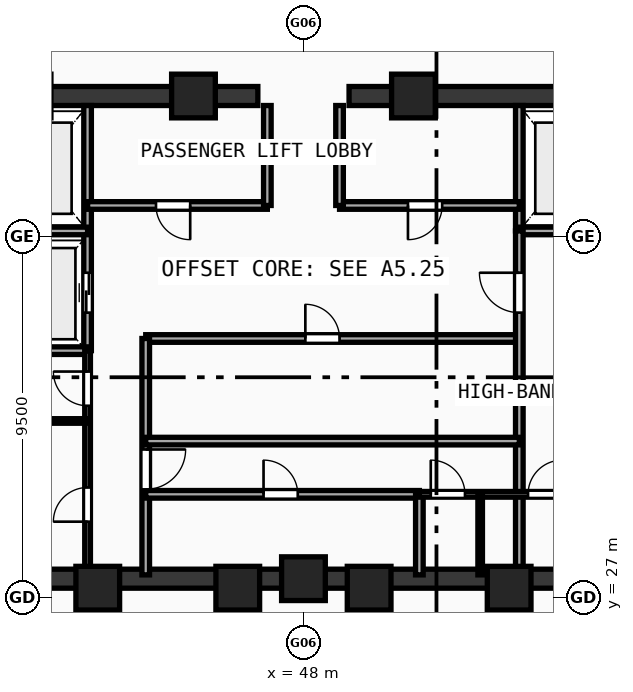
"""IFC4 building model, lengths in metres.
Left out: names, types, materials, properties, quantities, classifications, styles, units other than length and angle.
Written with IfcOpenShell. Run it as: python <this file> out.ifc"""

import sys

from ifc_helpers import new_model, si_unit, direction, frame, frame_2d, origin, origin_with_axes, origin_2d, place, context, subcontext, project, spatial, rectangle, hollow_rectangle, extrude, source, transform, mapped, element, fill, save


model = new_model("IFC4")
c1 = context("Model", 3, precision=1e-05, world=origin(), true_north=direction((0.0, 1.0)))
c2 = subcontext(c1, "Body", "Model", "MODEL_VIEW")
j1 = project(units=[si_unit("LENGTHUNIT", "METRE"), si_unit("PLANEANGLEUNIT", "RADIAN")], contexts=[c1])
p1 = place(None, origin())
s1 = spatial("IfcSite", under=j1, at=p1, CompositionType="ELEMENT")
p2 = place(p1, origin())
s2 = spatial("IfcBuilding", under=s1, at=p2, CompositionType="ELEMENT")
p3 = place(p2, frame((0.0, 0.0, 396.76)))
s3 = spatial("IfcBuildingStorey", under=s2, at=p3, CompositionType="ELEMENT", Elevation=396.76)
p4 = place(p3, frame((35.55, 27.5, 0.0), z_axis=(0.0, 0.0, 1.0), x_axis=(1.0, 0.0, 0.0)))
e1 = element("IfcWall", 1, at=p4, inside=s3, PredefinedType="SHEAR", context=c2, shape_type="SweptSolid", body=[
    extrude(rectangle(XDim=24.9, YDim=0.5, at=frame_2d((12.45, 0.0))), origin(), (0.0, 0.0, 1.0), 4.72),
])
p5 = place(p3, frame((35.55, 40.2, 0.0), z_axis=(0.0, 0.0, 1.0), x_axis=(1.0, 0.0, 0.0)))
e2 = element("IfcWall", 2, at=p5, inside=s3, PredefinedType="SHEAR", context=c2, shape_type="SweptSolid", body=[
    extrude(rectangle(XDim=11.25, YDim=0.5, at=frame_2d((5.625, 0.0))), origin(), (0.0, 0.0, 1.0), 4.72),
])
p6 = place(p5, frame((1.6, 0.0, 0.0)))
e3 = element("IfcOpeningElement", 3, at=p6, cuts=e2, PredefinedType="OPENING", context=c2, shape_type="SweptSolid", body=[
    extrude(rectangle(XDim=1.05, YDim=2.1, at=frame_2d((0.525, 1.05))), frame((0.0, 0.26, 0.0), z_axis=(0.0, -1.0, 0.0), x_axis=(1.0, 0.0, 0.0)), (0.0, 0.0, 1.0), 0.52),
])
p7 = place(p3, frame((49.2, 40.2, 0.0), z_axis=(0.0, 0.0, 1.0), x_axis=(1.0, 0.0, 0.0)))
e4 = element("IfcWall", 4, at=p7, inside=s3, PredefinedType="SHEAR", context=c2, shape_type="SweptSolid", body=[
    extrude(rectangle(XDim=11.25, YDim=0.5, at=frame_2d((5.625, 0.0))), origin(), (0.0, 0.0, 1.0), 4.72),
])
p8 = place(p7, frame((8.6, 0.0, 0.0)))
e5 = element("IfcOpeningElement", 5, at=p8, cuts=e4, PredefinedType="OPENING", context=c2, shape_type="SweptSolid", body=[
    extrude(rectangle(XDim=1.05, YDim=2.1, at=frame_2d((0.525, 1.05))), frame((0.0, 0.26, 0.0), z_axis=(0.0, -1.0, 0.0), x_axis=(1.0, 0.0, 0.0)), (0.0, 0.0, 1.0), 0.52),
])
m1 = source(origin(), c2, "Body", "SweptSolid", [
    extrude(hollow_rectangle(XDim=1.15, YDim=1.15, WallThickness=0.048, at=origin_2d()), origin(), (0.0, 0.0, 1.0), 5.0),
])
for number, where, z_axis, x_axis in (
    (6, (42.588, 27.25, -0.28), (0.0, 0.0, 1.0), (1.0, 0.0, 0.0)),
    (7, (46.272, 27.25, -0.28), (0.0, 0.0, 1.0), (1.0, 0.0, 0.0)),
    (8, (49.729, 27.25, -0.28), (0.0, 0.0, 1.0), (1.0, 0.0, 0.0)),
    (9, (53.412, 27.25, -0.28), (0.0, 0.0, 1.0), (1.0, 0.0, 0.0)),
    (10, (50.894, 40.2, -0.28), (0.0, 0.0, 1.0), (1.0, 0.0, 0.0)),
    (11, (45.106, 40.2, -0.28), (0.0, 0.0, 1.0), (1.0, 0.0, 0.0)),
    (12, (48.0, 27.5, -0.28), (0.0, 0.0, 1.0), (1.0, 0.0, 0.0)),
):
    element("IfcColumn", number, at=place(p3, frame(where, z_axis=z_axis, x_axis=x_axis)), inside=s3, PredefinedType="COLUMN", context=c2, shape_type="MappedRepresentation", body=[
        mapped(m1, transform((0.0, 0.0, 0.0), scale=1.0)),
    ])
p9 = place(p3, frame((42.32, 33.5, 0.0), z_axis=(0.0, 0.0, 1.0), x_axis=(0.0, 1.0, 0.0)))
e13 = element("IfcWall", 13, at=p9, inside=s3, PredefinedType="SOLIDWALL", context=c2, shape_type="SweptSolid", body=[
    extrude(rectangle(XDim=6.45, YDim=0.2, at=frame_2d((3.225, 0.0))), origin(), (0.0, 0.0, 1.0), 4.72),
])
p10 = place(p9, frame((1.0, 0.0, 0.0)))
e14 = element("IfcOpeningElement", 14, at=p10, cuts=e13, PredefinedType="OPENING", context=c2, shape_type="SweptSolid", body=[
    extrude(rectangle(XDim=1.05, YDim=2.1, at=frame_2d((0.525, 1.05))), frame((0.0, 0.11, 0.0), z_axis=(0.0, -1.0, 0.0), x_axis=(1.0, 0.0, 0.0)), (0.0, 0.0, 1.0), 0.22),
])
for number, where, z_axis, x_axis in (
    (15, (39.6, 36.65, 0.0), (0.0, 0.0, 1.0), (1.0, 0.0, 0.0)),
    (16, (39.6, 33.5, 0.0), (0.0, 0.0, 1.0), (1.0, 0.0, 0.0)),
):
    element("IfcWall", number, at=place(p3, frame(where, z_axis=z_axis, x_axis=x_axis)), inside=s3, PredefinedType="SOLIDWALL", context=c2, shape_type="SweptSolid", body=[
        extrude(rectangle(XDim=2.72, YDim=0.2, at=frame_2d((1.36, 0.0))), origin(), (0.0, 0.0, 1.0), 4.72),
    ])
p11 = place(p3, frame((53.68, 36.65, 0.0), z_axis=(0.0, 0.0, 1.0), x_axis=(0.0, 1.0, 0.0)))
e17 = element("IfcWall", 17, at=p11, inside=s3, PredefinedType="SOLIDWALL", context=c2, shape_type="SweptSolid", body=[
    extrude(rectangle(XDim=3.3, YDim=0.2, at=frame_2d((1.65, 0.0))), origin(), (0.0, 0.0, 1.0), 4.72),
])
p12 = place(p3, frame((53.68, 36.65, 0.0), z_axis=(0.0, 0.0, 1.0), x_axis=(1.0, 0.0, 0.0)))
e18 = element("IfcWall", 18, at=p12, inside=s3, PredefinedType="SOLIDWALL", context=c2, shape_type="SweptSolid", body=[
    extrude(rectangle(XDim=2.72, YDim=0.2, at=frame_2d((1.36, 0.0))), origin(), (0.0, 0.0, 1.0), 4.72),
])
p13 = place(p3, frame((42.32, 37.32, 0.0), z_axis=(0.0, 0.0, 1.0), x_axis=(1.0, 0.0, 0.0)))
e19 = element("IfcWall", 19, at=p13, inside=s3, PredefinedType="SOLIDWALL", context=c2, shape_type="SweptSolid", body=[
    extrude(rectangle(XDim=4.73, YDim=0.2, at=frame_2d((2.365, 0.0))), origin(), (0.0, 0.0, 1.0), 4.72),
])
p14 = place(p13, frame((1.8, 0.0, 0.0)))
e20 = element("IfcOpeningElement", 20, at=p14, cuts=e19, PredefinedType="OPENING", context=c2, shape_type="SweptSolid", body=[
    extrude(rectangle(XDim=0.9, YDim=2.1, at=frame_2d((0.45, 1.05))), frame((0.0, 0.11, 0.0), z_axis=(0.0, -1.0, 0.0), x_axis=(1.0, 0.0, 0.0)), (0.0, 0.0, 1.0), 0.22),
])
p15 = place(p3, frame((48.95, 37.32, 0.0), z_axis=(0.0, 0.0, 1.0), x_axis=(1.0, 0.0, 0.0)))
e21 = element("IfcWall", 21, at=p15, inside=s3, PredefinedType="SOLIDWALL", context=c2, shape_type="SweptSolid", body=[
    extrude(rectangle(XDim=4.73, YDim=0.2, at=frame_2d((2.365, 0.0))), origin(), (0.0, 0.0, 1.0), 4.72),
])
p16 = place(p15, frame((1.8, 0.0, 0.0)))
e22 = element("IfcOpeningElement", 22, at=p16, cuts=e21, PredefinedType="OPENING", context=c2, shape_type="SweptSolid", body=[
    extrude(rectangle(XDim=0.9, YDim=2.1, at=frame_2d((0.45, 1.05))), frame((0.0, 0.11, 0.0), z_axis=(0.0, -1.0, 0.0), x_axis=(1.0, 0.0, 0.0)), (0.0, 0.0, 1.0), 0.22),
])
for number, where, z_axis, x_axis in (
    (23, (47.05, 37.32, 0.0), (0.0, 0.0, 1.0), (0.0, 1.0, 0.0)),
    (24, (48.95, 37.32, 0.0), (0.0, 0.0, 1.0), (0.0, 1.0, 0.0)),
):
    element("IfcWall", number, at=place(p3, frame(where, z_axis=z_axis, x_axis=x_axis)), inside=s3, PredefinedType="SOLIDWALL", context=c2, shape_type="SweptSolid", body=[
        extrude(rectangle(XDim=2.63, YDim=0.2, at=frame_2d((1.315, 0.0))), origin(), (0.0, 0.0, 1.0), 4.72),
    ])
p17 = place(p3, frame((43.85, 33.82, 0.0), z_axis=(0.0, 0.0, 1.0), x_axis=(1.0, 0.0, 0.0)))
e25 = element("IfcWall", 25, at=p17, inside=s3, PredefinedType="SOLIDWALL", context=c2, shape_type="SweptSolid", body=[
    extrude(rectangle(XDim=9.83, YDim=0.2, at=frame_2d((4.915, 0.0))), origin(), (0.0, 0.0, 1.0), 4.72),
])
p18 = place(p17, frame((4.2, 0.0, 0.0)))
e26 = element("IfcOpeningElement", 26, at=p18, cuts=e25, PredefinedType="OPENING", context=c2, shape_type="SweptSolid", body=[
    extrude(rectangle(XDim=0.9, YDim=2.1, at=frame_2d((0.45, 1.05))), frame((0.0, 0.11, 0.0), z_axis=(0.0, -1.0, 0.0), x_axis=(1.0, 0.0, 0.0)), (0.0, 0.0, 1.0), 0.22),
])
p19 = place(p3, frame((43.85, 27.6, 0.0), z_axis=(0.0, 0.0, 1.0), x_axis=(0.0, 1.0, 0.0)))
e27 = element("IfcWall", 27, at=p19, inside=s3, PredefinedType="SOLIDWALL", context=c2, shape_type="SweptSolid", body=[
    extrude(rectangle(XDim=6.22, YDim=0.2, at=frame_2d((3.11, 0.0))), origin(), (0.0, 0.0, 1.0), 4.72),
])
p20 = place(p19, frame((2.25, 0.0, 0.0)))
e28 = element("IfcOpeningElement", 28, at=p20, cuts=e27, PredefinedType="OPENING", context=c2, shape_type="SweptSolid", body=[
    extrude(rectangle(XDim=1.05, YDim=2.1, at=frame_2d((0.525, 1.05))), frame((0.0, 0.11, 0.0), z_axis=(0.0, -1.0, 0.0), x_axis=(1.0, 0.0, 0.0)), (0.0, 0.0, 1.0), 0.22),
])
p21 = place(p3, frame((53.68, 27.6, 0.0), z_axis=(0.0, 0.0, 1.0), x_axis=(0.0, 1.0, 0.0)))
e29 = element("IfcWall", 29, at=p21, inside=s3, PredefinedType="SOLIDWALL", context=c2, shape_type="SweptSolid", body=[
    extrude(rectangle(XDim=9.05, YDim=0.2, at=frame_2d((4.525, 0.0))), origin(), (0.0, 0.0, 1.0), 4.72),
])
p22 = place(p21, frame((6.9, 0.0, 0.0)))
e30 = element("IfcOpeningElement", 30, at=p22, cuts=e29, PredefinedType="OPENING", context=c2, shape_type="SweptSolid", body=[
    extrude(rectangle(XDim=1.05, YDim=2.1, at=frame_2d((0.525, 1.05))), frame((0.0, 0.11, 0.0), z_axis=(0.0, -1.0, 0.0), x_axis=(1.0, 0.0, 0.0)), (0.0, 0.0, 1.0), 0.22),
])
p23 = place(p3, frame((43.85, 29.72, 0.0), z_axis=(0.0, 0.0, 1.0), x_axis=(1.0, 0.0, 0.0)))
e31 = element("IfcWall", 31, at=p23, inside=s3, PredefinedType="SOLIDWALL", context=c2, shape_type="SweptSolid", body=[
    extrude(rectangle(XDim=7.2, YDim=0.2, at=frame_2d((3.6, 0.0))), origin(), (0.0, 0.0, 1.0), 4.72),
])
p24 = place(p23, frame((3.1, 0.0, 0.0)))
e32 = element("IfcOpeningElement", 32, at=p24, cuts=e31, PredefinedType="OPENING", context=c2, shape_type="SweptSolid", body=[
    extrude(rectangle(XDim=0.9, YDim=2.1, at=frame_2d((0.45, 1.05))), frame((0.0, 0.11, 0.0), z_axis=(0.0, -1.0, 0.0), x_axis=(1.0, 0.0, 0.0)), (0.0, 0.0, 1.0), 0.22),
])
p25 = place(p3, frame((51.05, 27.6, 0.0), z_axis=(0.0, 0.0, 1.0), x_axis=(0.0, 1.0, 0.0)))
e33 = element("IfcWall", 33, at=p25, inside=s3, PredefinedType="SOLIDWALL", context=c2, shape_type="SweptSolid", body=[
    extrude(rectangle(XDim=2.12, YDim=0.2, at=frame_2d((1.06, 0.0))), origin(), (0.0, 0.0, 1.0), 4.72),
])
p26 = place(p3, frame((43.85, 31.12, 0.0), z_axis=(0.0, 0.0, 1.0), x_axis=(1.0, 0.0, 0.0)))
e34 = element("IfcWall", 34, at=p26, inside=s3, PredefinedType="SOLIDWALL", context=c2, shape_type="SweptSolid", body=[
    extrude(rectangle(XDim=9.83, YDim=0.2, at=frame_2d((4.915, 0.0))), origin(), (0.0, 0.0, 1.0), 4.72),
])
p27 = place(p3, frame((42.32, 27.6, 0.0), z_axis=(0.0, 0.0, 1.0), x_axis=(0.0, 1.0, 0.0)))
e35 = element("IfcWall", 35, at=p27, inside=s3, PredefinedType="PARTITIONING", context=c2, shape_type="SweptSolid", body=[
    extrude(rectangle(XDim=5.9, YDim=0.15, at=frame_2d((2.95, 0.0))), origin(), (0.0, 0.0, 1.0), 4.72),
])
p28 = place(p27, frame((1.4, 0.0, 0.0)))
e36 = element("IfcOpeningElement", 36, at=p28, cuts=e35, PredefinedType="OPENING", context=c2, shape_type="SweptSolid", body=[
    extrude(rectangle(XDim=0.9, YDim=2.1, at=frame_2d((0.45, 1.05))), frame((0.0, 0.085, 0.0), z_axis=(0.0, -1.0, 0.0), x_axis=(1.0, 0.0, 0.0)), (0.0, 0.0, 1.0), 0.17),
])
p29 = place(p27, frame((4.45, 0.0, 0.0)))
e37 = element("IfcOpeningElement", 37, at=p29, cuts=e35, PredefinedType="OPENING", context=c2, shape_type="SweptSolid", body=[
    extrude(rectangle(XDim=0.9, YDim=2.1, at=frame_2d((0.45, 1.05))), frame((0.0, 0.085, 0.0), z_axis=(0.0, -1.0, 0.0), x_axis=(1.0, 0.0, 0.0)), (0.0, 0.0, 1.0), 0.17),
])
p30 = place(p3, frame((51.05, 29.72, 0.0), z_axis=(0.0, 0.0, 1.0), x_axis=(1.0, 0.0, 0.0)))
e38 = element("IfcWall", 38, at=p30, inside=s3, PredefinedType="PARTITIONING", context=c2, shape_type="SweptSolid", body=[
    extrude(rectangle(XDim=4.07, YDim=0.15, at=frame_2d((2.035, 0.0))), origin(), (0.0, 0.0, 1.0), 4.72),
])
p31 = place(p30, frame((0.3, 0.0, 0.0)))
e39 = element("IfcOpeningElement", 39, at=p31, cuts=e38, PredefinedType="OPENING", context=c2, shape_type="SweptSolid", body=[
    extrude(rectangle(XDim=0.9, YDim=2.1, at=frame_2d((0.45, 1.05))), frame((0.0, 0.085, 0.0), z_axis=(0.0, -1.0, 0.0), x_axis=(1.0, 0.0, 0.0)), (0.0, 0.0, 1.0), 0.17),
])
p32 = place(p30, frame((2.86, 0.0, 0.0)))
e40 = element("IfcOpeningElement", 40, at=p32, cuts=e38, PredefinedType="OPENING", context=c2, shape_type="SweptSolid", body=[
    extrude(rectangle(XDim=0.9, YDim=2.1, at=frame_2d((0.45, 1.05))), frame((0.0, 0.085, 0.0), z_axis=(0.0, -1.0, 0.0), x_axis=(1.0, 0.0, 0.0)), (0.0, 0.0, 1.0), 0.17),
])
p33 = place(p3, frame((39.6, 31.65, 0.0), z_axis=(0.0, 0.0, 1.0), x_axis=(1.0, 0.0, 0.0)))
e41 = element("IfcWall", 41, at=p33, inside=s3, PredefinedType="PARTITIONING", context=c2, shape_type="SweptSolid", body=[
    extrude(rectangle(XDim=2.72, YDim=0.12, at=frame_2d((1.36, 0.0))), origin(), (0.0, 0.0, 1.0), 4.72),
])
p34 = place(p3, frame((52.65, 27.6, 0.0), z_axis=(0.0, 0.0, 1.0), x_axis=(0.0, 1.0, 0.0)))
e42 = element("IfcWall", 42, at=p34, inside=s3, PredefinedType="PARTITIONING", context=c2, shape_type="SweptSolid", body=[
    extrude(rectangle(XDim=2.12, YDim=0.12, at=frame_2d((1.06, 0.0))), origin(), (0.0, 0.0, 1.0), 4.72),
])
m2 = source(origin(), c2, "Body", "SweptSolid", [
    extrude(rectangle(XDim=1.05, YDim=2.1, at=frame_2d((0.525, 1.05))), frame((0.0, 0.025, 0.0), z_axis=(0.0, -1.0, 0.0), x_axis=(1.0, 0.0, 0.0)), (0.0, 0.0, 1.0), 0.05),
])
p35 = place(p10, origin_with_axes())
e43 = element("IfcDoor", 43, at=p35, inside=s3, OperationType="DOUBLE_DOOR_SLIDING", PredefinedType="DOOR", context=c2, shape_type="MappedRepresentation", body=[
    mapped(m2, transform((0.0, 0.0, 0.0), scale=1.0)),
])
fill(e14, e43)
m3 = source(origin(), c2, "Body", "SweptSolid", [
    extrude(rectangle(XDim=0.9, YDim=2.1, at=frame_2d((0.45, 1.05))), frame((0.0, 0.025, 0.0), z_axis=(0.0, -1.0, 0.0), x_axis=(1.0, 0.0, 0.0)), (0.0, 0.0, 1.0), 0.05),
])
p36 = place(p14, frame((0.9, 0.0, 0.0), z_axis=(0.0, 0.0, 1.0), x_axis=(-1.0, 0.0, 0.0)))
e44 = element("IfcDoor", 44, at=p36, inside=s3, OperationType="SINGLE_SWING_LEFT", PredefinedType="DOOR", context=c2, shape_type="MappedRepresentation", body=[
    mapped(m3, transform((0.0, 0.0, 0.0), scale=1.0)),
])
fill(e20, e44)
p37 = place(p16, frame((0.9, 0.0, 0.0), z_axis=(0.0, 0.0, 1.0), x_axis=(-1.0, 0.0, 0.0)))
e45 = element("IfcDoor", 45, at=p37, inside=s3, OperationType="SINGLE_SWING_RIGHT", PredefinedType="DOOR", context=c2, shape_type="MappedRepresentation", body=[
    mapped(m3, transform((0.0, 0.0, 0.0), scale=1.0)),
])
fill(e22, e45)
p38 = place(p18, origin_with_axes())
e46 = element("IfcDoor", 46, at=p38, inside=s3, OperationType="SINGLE_SWING_LEFT", PredefinedType="DOOR", context=c2, shape_type="MappedRepresentation", body=[
    mapped(m3, transform((0.0, 0.0, 0.0), scale=1.0)),
])
fill(e26, e46)
p39 = place(p20, frame((1.05, 0.0, 0.0), z_axis=(0.0, 0.0, 1.0), x_axis=(-1.0, 0.0, 0.0)))
e47 = element("IfcDoor", 47, at=p39, inside=s3, OperationType="SINGLE_SWING_LEFT", PredefinedType="DOOR", context=c2, shape_type="MappedRepresentation", body=[
    mapped(m2, transform((0.0, 0.0, 0.0), scale=1.0)),
])
fill(e28, e47)
p40 = place(p22, origin_with_axes())
e48 = element("IfcDoor", 48, at=p40, inside=s3, OperationType="SINGLE_SWING_RIGHT", PredefinedType="DOOR", context=c2, shape_type="MappedRepresentation", body=[
    mapped(m2, transform((0.0, 0.0, 0.0), scale=1.0)),
])
fill(e30, e48)
p41 = place(p24, origin_with_axes())
e49 = element("IfcDoor", 49, at=p41, inside=s3, OperationType="SINGLE_SWING_LEFT", PredefinedType="DOOR", context=c2, shape_type="MappedRepresentation", body=[
    mapped(m3, transform((0.0, 0.0, 0.0), scale=1.0)),
])
fill(e32, e49)
p42 = place(p28, origin_with_axes())
e50 = element("IfcDoor", 50, at=p42, inside=s3, OperationType="SINGLE_SWING_LEFT", PredefinedType="DOOR", context=c2, shape_type="MappedRepresentation", body=[
    mapped(m3, transform((0.0, 0.0, 0.0), scale=1.0)),
])
fill(e36, e50)
p43 = place(p29, origin_with_axes())
e51 = element("IfcDoor", 51, at=p43, inside=s3, OperationType="SINGLE_SWING_RIGHT", PredefinedType="DOOR", context=c2, shape_type="MappedRepresentation", body=[
    mapped(m3, transform((0.0, 0.0, 0.0), scale=1.0)),
])
fill(e37, e51)
p44 = place(p31, origin_with_axes())
e52 = element("IfcDoor", 52, at=p44, inside=s3, OperationType="SINGLE_SWING_LEFT", PredefinedType="DOOR", context=c2, shape_type="MappedRepresentation", body=[
    mapped(m3, transform((0.0, 0.0, 0.0), scale=1.0)),
])
fill(e39, e52)
p45 = place(p32, origin_with_axes())
e53 = element("IfcDoor", 53, at=p45, inside=s3, OperationType="SINGLE_SWING_RIGHT", PredefinedType="DOOR", context=c2, shape_type="MappedRepresentation", body=[
    mapped(m3, transform((0.0, 0.0, 0.0), scale=1.0)),
])
fill(e40, e53)
save(model, sys.argv[1])
